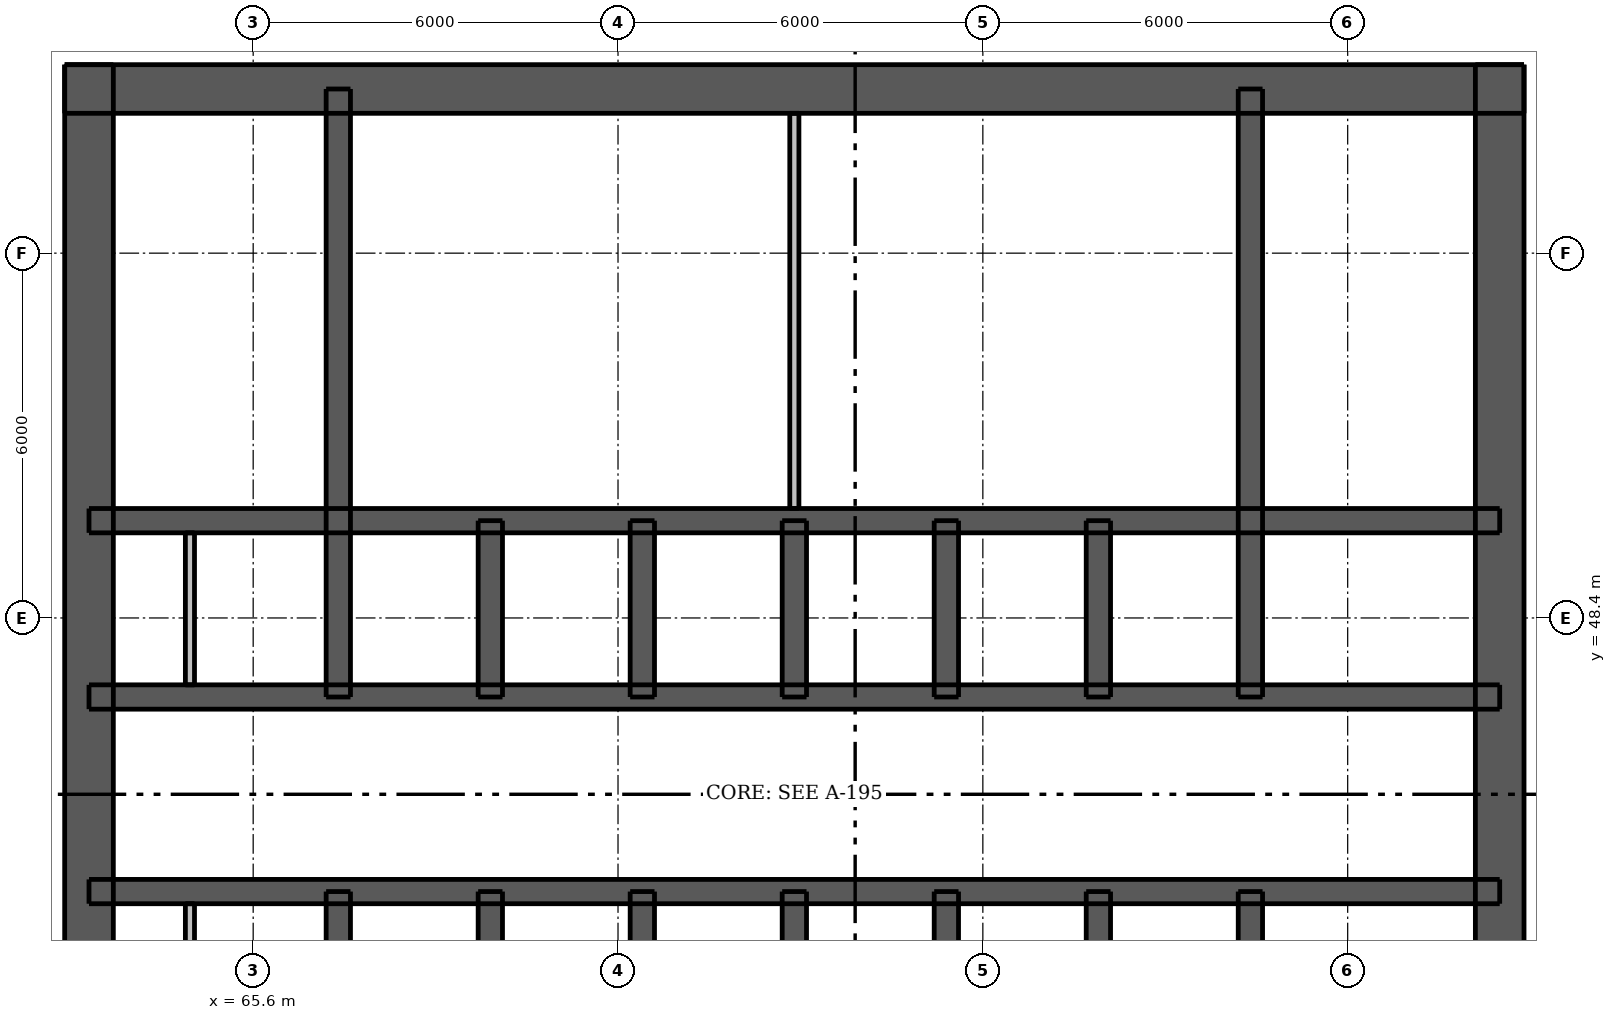
"""IFC4 building model, lengths in metres.
Left out: names, types, materials, properties, quantities, classifications, styles, units other than length and angle.
Written with IfcOpenShell. Run it as: python <this file> out.ifc"""

import sys

from ifc_helpers import new_model, si_unit, direction, frame, frame_2d, origin, place, context, subcontext, project, spatial, rectangle, extrude, element, fill, save


model = new_model("IFC4")
c1 = context("Model", 3, precision=1e-05, world=origin(), true_north=direction((0.0, 1.0)))
c2 = subcontext(c1, "Body", "Model", "MODEL_VIEW")
j1 = project(units=[si_unit("LENGTHUNIT", "METRE"), si_unit("PLANEANGLEUNIT", "RADIAN")], contexts=[c1])
p1 = place(None, origin())
s1 = spatial("IfcSite", under=j1, at=p1, CompositionType="ELEMENT")
p2 = place(p1, origin())
s2 = spatial("IfcBuilding", under=s1, at=p2, CompositionType="ELEMENT")
p3 = place(p2, frame((0.0, 0.0, 108.4)))
s3 = spatial("IfcBuildingStorey", under=s2, at=p3, CompositionType="ELEMENT", Elevation=108.4)
p4 = place(p3, frame((62.5, 57.1, 0.0), z_axis=(0.0, 0.0, 1.0), x_axis=(1.0, 0.0, 0.0)))
e1 = element("IfcWall", 1, at=p4, inside=s3, PredefinedType="SHEAR", context=c2, shape_type="SweptSolid", body=[
    extrude(rectangle(XDim=24.0, YDim=0.8, at=frame_2d((12.0, 0.0))), origin(), (0.0, 0.0, 1.0), 3.05),
])
p5 = place(p4, frame((20.9, 0.0, 0.0)))
e2 = element("IfcOpeningElement", 2, at=p5, cuts=e1, PredefinedType="OPENING", context=c2, shape_type="SweptSolid", body=[
    extrude(rectangle(XDim=1.1, YDim=2.1, at=frame_2d((0.55, 1.05))), frame((0.0, 0.41, 0.0), z_axis=(0.0, -1.0, 0.0), x_axis=(1.0, 0.0, 0.0)), (0.0, 0.0, 1.0), 0.82),
])
p6 = place(p4, frame((2.0, 0.0, 0.0)))
e3 = element("IfcOpeningElement", 3, at=p6, cuts=e1, PredefinedType="OPENING", context=c2, shape_type="SweptSolid", body=[
    extrude(rectangle(XDim=1.1, YDim=2.1, at=frame_2d((0.55, 1.05))), frame((0.0, 0.41, 0.0), z_axis=(0.0, -1.0, 0.0), x_axis=(1.0, 0.0, 0.0)), (0.0, 0.0, 1.0), 0.82),
])
p7 = place(p4, frame((7.9, 0.0, 0.0)))
e4 = element("IfcOpeningElement", 4, at=p7, cuts=e1, PredefinedType="OPENING", context=c2, shape_type="SweptSolid", body=[
    extrude(rectangle(XDim=0.9, YDim=2.1, at=frame_2d((0.45, 1.05))), frame((0.0, 0.41, 0.0), z_axis=(0.0, -1.0, 0.0), x_axis=(1.0, 0.0, 0.0)), (0.0, 0.0, 1.0), 0.82),
])
p8 = place(p4, frame((15.2, 0.0, 0.0)))
e5 = element("IfcOpeningElement", 5, at=p8, cuts=e1, PredefinedType="OPENING", context=c2, shape_type="SweptSolid", body=[
    extrude(rectangle(XDim=0.9, YDim=2.1, at=frame_2d((0.45, 1.05))), frame((0.0, 0.41, 0.0), z_axis=(0.0, -1.0, 0.0), x_axis=(1.0, 0.0, 0.0)), (0.0, 0.0, 1.0), 0.82),
])
p9 = place(p3, frame((62.9, 33.5, 0.0), z_axis=(0.0, 0.0, 1.0), x_axis=(0.0, 1.0, 0.0)))
e6 = element("IfcWall", 6, at=p9, inside=s3, PredefinedType="SHEAR", context=c2, shape_type="SweptSolid", body=[
    extrude(rectangle(XDim=24.0, YDim=0.8, at=frame_2d((12.0, 0.0))), origin(), (0.0, 0.0, 1.0), 3.05),
])
p10 = place(p9, frame((11.2, 0.0, 0.0)))
e7 = element("IfcOpeningElement", 7, at=p10, cuts=e6, PredefinedType="OPENING", context=c2, shape_type="SweptSolid", body=[
    extrude(rectangle(XDim=1.6, YDim=2.1, at=frame_2d((0.8, 1.05))), frame((0.0, 0.41, 0.0), z_axis=(0.0, -1.0, 0.0), x_axis=(1.0, 0.0, 0.0)), (0.0, 0.0, 1.0), 0.82),
])
p11 = place(p3, frame((86.1, 33.5, 0.0), z_axis=(0.0, 0.0, 1.0), x_axis=(0.0, 1.0, 0.0)))
e8 = element("IfcWall", 8, at=p11, inside=s3, PredefinedType="SHEAR", context=c2, shape_type="SweptSolid", body=[
    extrude(rectangle(XDim=24.0, YDim=0.8, at=frame_2d((12.0, 0.0))), origin(), (0.0, 0.0, 1.0), 3.05),
])
p12 = place(p11, frame((11.2, 0.0, 0.0)))
e9 = element("IfcOpeningElement", 9, at=p12, cuts=e8, PredefinedType="OPENING", context=c2, shape_type="SweptSolid", body=[
    extrude(rectangle(XDim=1.6, YDim=2.1, at=frame_2d((0.8, 1.05))), frame((0.0, 0.41, 0.0), z_axis=(0.0, -1.0, 0.0), x_axis=(1.0, 0.0, 0.0)), (0.0, 0.0, 1.0), 0.82),
])
p13 = place(p3, frame((62.9, 43.9, 0.0), z_axis=(0.0, 0.0, 1.0), x_axis=(1.0, 0.0, 0.0)))
e10 = element("IfcWall", 10, at=p13, inside=s3, PredefinedType="SHEAR", context=c2, shape_type="SweptSolid", body=[
    extrude(rectangle(XDim=23.2, YDim=0.4, at=frame_2d((11.6, 0.0))), origin(), (0.0, 0.0, 1.0), 3.05),
])
p14 = place(p13, frame((0.63, 0.0, 0.0)))
e11 = element("IfcOpeningElement", 11, at=p14, cuts=e10, PredefinedType="OPENING", context=c2, shape_type="SweptSolid", body=[
    extrude(rectangle(XDim=0.8, YDim=2.1, at=frame_2d((0.4, 1.05))), frame((0.0, 0.21, 0.0), z_axis=(0.0, -1.0, 0.0), x_axis=(1.0, 0.0, 0.0)), (0.0, 0.0, 1.0), 0.42),
])
p15 = place(p13, frame((2.33, 0.0, 0.0)))
e12 = element("IfcOpeningElement", 12, at=p15, cuts=e10, PredefinedType="OPENING", context=c2, shape_type="SweptSolid", body=[
    extrude(rectangle(XDim=0.9, YDim=2.1, at=frame_2d((0.45, 1.05))), frame((0.0, 0.21, 0.0), z_axis=(0.0, -1.0, 0.0), x_axis=(1.0, 0.0, 0.0)), (0.0, 0.0, 1.0), 0.42),
])
p16 = place(p13, frame((20.6, 0.0, 0.0)))
e13 = element("IfcOpeningElement", 13, at=p16, cuts=e10, PredefinedType="OPENING", context=c2, shape_type="SweptSolid", body=[
    extrude(rectangle(XDim=0.9, YDim=2.1, at=frame_2d((0.45, 1.05))), frame((0.0, 0.21, 0.0), z_axis=(0.0, -1.0, 0.0), x_axis=(1.0, 0.0, 0.0)), (0.0, 0.0, 1.0), 0.42),
])
p17 = place(p13, frame((4.8, 0.0, 0.0)))
e14 = element("IfcOpeningElement", 14, at=p17, cuts=e10, PredefinedType="OPENING", context=c2, shape_type="SweptSolid", body=[
    extrude(rectangle(XDim=1.1, YDim=2.1, at=frame_2d((0.55, 1.05))), frame((0.0, 0.21, 0.0), z_axis=(0.0, -1.0, 0.0), x_axis=(1.0, 0.0, 0.0)), (0.0, 0.0, 1.0), 0.42),
])
p18 = place(p13, frame((7.3, 0.0, 0.0)))
e15 = element("IfcOpeningElement", 15, at=p18, cuts=e10, PredefinedType="OPENING", context=c2, shape_type="SweptSolid", body=[
    extrude(rectangle(XDim=1.1, YDim=2.1, at=frame_2d((0.55, 1.05))), frame((0.0, 0.21, 0.0), z_axis=(0.0, -1.0, 0.0), x_axis=(1.0, 0.0, 0.0)), (0.0, 0.0, 1.0), 0.42),
])
p19 = place(p13, frame((9.8, 0.0, 0.0)))
e16 = element("IfcOpeningElement", 16, at=p19, cuts=e10, PredefinedType="OPENING", context=c2, shape_type="SweptSolid", body=[
    extrude(rectangle(XDim=1.1, YDim=2.1, at=frame_2d((0.55, 1.05))), frame((0.0, 0.21, 0.0), z_axis=(0.0, -1.0, 0.0), x_axis=(1.0, 0.0, 0.0)), (0.0, 0.0, 1.0), 0.42),
])
p20 = place(p13, frame((12.3, 0.0, 0.0)))
e17 = element("IfcOpeningElement", 17, at=p20, cuts=e10, PredefinedType="OPENING", context=c2, shape_type="SweptSolid", body=[
    extrude(rectangle(XDim=1.1, YDim=2.1, at=frame_2d((0.55, 1.05))), frame((0.0, 0.21, 0.0), z_axis=(0.0, -1.0, 0.0), x_axis=(1.0, 0.0, 0.0)), (0.0, 0.0, 1.0), 0.42),
])
p21 = place(p13, frame((14.8, 0.0, 0.0)))
e18 = element("IfcOpeningElement", 18, at=p21, cuts=e10, PredefinedType="OPENING", context=c2, shape_type="SweptSolid", body=[
    extrude(rectangle(XDim=1.1, YDim=2.1, at=frame_2d((0.55, 1.05))), frame((0.0, 0.21, 0.0), z_axis=(0.0, -1.0, 0.0), x_axis=(1.0, 0.0, 0.0)), (0.0, 0.0, 1.0), 0.42),
])
p22 = place(p13, frame((17.3, 0.0, 0.0)))
e19 = element("IfcOpeningElement", 19, at=p22, cuts=e10, PredefinedType="OPENING", context=c2, shape_type="SweptSolid", body=[
    extrude(rectangle(XDim=1.1, YDim=2.1, at=frame_2d((0.55, 1.05))), frame((0.0, 0.21, 0.0), z_axis=(0.0, -1.0, 0.0), x_axis=(1.0, 0.0, 0.0)), (0.0, 0.0, 1.0), 0.42),
])
p23 = place(p3, frame((62.9, 47.1, 0.0), z_axis=(0.0, 0.0, 1.0), x_axis=(1.0, 0.0, 0.0)))
e20 = element("IfcWall", 20, at=p23, inside=s3, PredefinedType="SHEAR", context=c2, shape_type="SweptSolid", body=[
    extrude(rectangle(XDim=23.2, YDim=0.4, at=frame_2d((11.6, 0.0))), origin(), (0.0, 0.0, 1.0), 3.05),
])
p24 = place(p23, frame((0.63, 0.0, 0.0)))
e21 = element("IfcOpeningElement", 21, at=p24, cuts=e20, PredefinedType="OPENING", context=c2, shape_type="SweptSolid", body=[
    extrude(rectangle(XDim=0.8, YDim=2.1, at=frame_2d((0.4, 1.05))), frame((0.0, 0.21, 0.0), z_axis=(0.0, -1.0, 0.0), x_axis=(1.0, 0.0, 0.0)), (0.0, 0.0, 1.0), 0.42),
])
p25 = place(p23, frame((2.33, 0.0, 0.0)))
e22 = element("IfcOpeningElement", 22, at=p25, cuts=e20, PredefinedType="OPENING", context=c2, shape_type="SweptSolid", body=[
    extrude(rectangle(XDim=0.9, YDim=2.1, at=frame_2d((0.45, 1.05))), frame((0.0, 0.21, 0.0), z_axis=(0.0, -1.0, 0.0), x_axis=(1.0, 0.0, 0.0)), (0.0, 0.0, 1.0), 0.42),
])
p26 = place(p23, frame((20.6, 0.0, 0.0)))
e23 = element("IfcOpeningElement", 23, at=p26, cuts=e20, PredefinedType="OPENING", context=c2, shape_type="SweptSolid", body=[
    extrude(rectangle(XDim=0.9, YDim=2.1, at=frame_2d((0.45, 1.05))), frame((0.0, 0.21, 0.0), z_axis=(0.0, -1.0, 0.0), x_axis=(1.0, 0.0, 0.0)), (0.0, 0.0, 1.0), 0.42),
])
p27 = place(p3, frame((62.9, 50.0, 0.0), z_axis=(0.0, 0.0, 1.0), x_axis=(1.0, 0.0, 0.0)))
e24 = element("IfcWall", 24, at=p27, inside=s3, PredefinedType="SHEAR", context=c2, shape_type="SweptSolid", body=[
    extrude(rectangle(XDim=23.2, YDim=0.4, at=frame_2d((11.6, 0.0))), origin(), (0.0, 0.0, 1.0), 3.05),
])
p28 = place(p3, frame((67.0, 33.9, 0.0), z_axis=(0.0, 0.0, 1.0), x_axis=(0.0, 1.0, 0.0)))
e25 = element("IfcWall", 25, at=p28, inside=s3, PredefinedType="SHEAR", context=c2, shape_type="SweptSolid", body=[
    extrude(rectangle(XDim=10.0, YDim=0.4, at=frame_2d((5.0, 0.0))), origin(), (0.0, 0.0, 1.0), 3.05),
])
p29 = place(p28, frame((0.6, 0.0, 0.0)))
e26 = element("IfcOpeningElement", 26, at=p29, cuts=e25, PredefinedType="OPENING", context=c2, shape_type="SweptSolid", body=[
    extrude(rectangle(XDim=1.1, YDim=2.1, at=frame_2d((0.55, 1.05))), frame((0.0, 0.21, 0.0), z_axis=(0.0, -1.0, 0.0), x_axis=(1.0, 0.0, 0.0)), (0.0, 0.0, 1.0), 0.42),
])
for number, where, z_axis, x_axis in (
    (27, (67.0, 47.1, 0.0), (0.0, 0.0, 1.0), (0.0, 1.0, 0.0)),
    (28, (82.0, 33.9, 0.0), (0.0, 0.0, 1.0), (0.0, 1.0, 0.0)),
    (29, (82.0, 47.1, 0.0), (0.0, 0.0, 1.0), (0.0, 1.0, 0.0)),
):
    element("IfcWall", number, at=place(p3, frame(where, z_axis=z_axis, x_axis=x_axis)), inside=s3, PredefinedType="SHEAR", context=c2, shape_type="SweptSolid", body=[
        extrude(rectangle(XDim=10.0, YDim=0.4, at=frame_2d((5.0, 0.0))), origin(), (0.0, 0.0, 1.0), 3.05),
    ])
for number, where, z_axis, x_axis in (
    (30, (69.5, 41.0, 0.0), (0.0, 0.0, 1.0), (0.0, 1.0, 0.0)),
    (31, (69.5, 47.1, 0.0), (0.0, 0.0, 1.0), (0.0, 1.0, 0.0)),
    (32, (72.0, 41.0, 0.0), (0.0, 0.0, 1.0), (0.0, 1.0, 0.0)),
    (33, (72.0, 47.1, 0.0), (0.0, 0.0, 1.0), (0.0, 1.0, 0.0)),
    (34, (74.5, 41.0, 0.0), (0.0, 0.0, 1.0), (0.0, 1.0, 0.0)),
    (35, (74.5, 47.1, 0.0), (0.0, 0.0, 1.0), (0.0, 1.0, 0.0)),
    (36, (77.0, 41.0, 0.0), (0.0, 0.0, 1.0), (0.0, 1.0, 0.0)),
    (37, (77.0, 47.1, 0.0), (0.0, 0.0, 1.0), (0.0, 1.0, 0.0)),
    (38, (79.5, 41.0, 0.0), (0.0, 0.0, 1.0), (0.0, 1.0, 0.0)),
    (39, (79.5, 47.1, 0.0), (0.0, 0.0, 1.0), (0.0, 1.0, 0.0)),
):
    element("IfcWall", number, at=place(p3, frame(where, z_axis=z_axis, x_axis=x_axis)), inside=s3, PredefinedType="SHEAR", context=c2, shape_type="SweptSolid", body=[
        extrude(rectangle(XDim=2.9, YDim=0.4, at=frame_2d((1.45, 0.0))), origin(), (0.0, 0.0, 1.0), 3.05),
    ])
for number, where, z_axis, x_axis in (
    (40, (64.56, 41.2, 0.0), (0.0, 0.0, 1.0), (0.0, 1.0, 0.0)),
    (41, (64.56, 47.3, 0.0), (0.0, 0.0, 1.0), (0.0, 1.0, 0.0)),
):
    element("IfcWall", number, at=place(p3, frame(where, z_axis=z_axis, x_axis=x_axis)), inside=s3, PredefinedType="PLUMBINGWALL", context=c2, shape_type="SweptSolid", body=[
        extrude(rectangle(XDim=2.5, YDim=0.15, at=frame_2d((1.25, 0.0))), origin(), (0.0, 0.0, 1.0), 3.05),
    ])
p30 = place(p3, frame((74.5, 50.2, 0.0), z_axis=(0.0, 0.0, 1.0), x_axis=(0.0, 1.0, 0.0)))
e42 = element("IfcWall", 42, at=p30, inside=s3, PredefinedType="PLUMBINGWALL", context=c2, shape_type="SweptSolid", body=[
    extrude(rectangle(XDim=6.5, YDim=0.15, at=frame_2d((3.25, 0.0))), origin(), (0.0, 0.0, 1.0), 3.05),
])
p31 = place(p5, origin())
e43 = element("IfcDoor", 43, at=p31, inside=s3, OperationType="SINGLE_SWING_RIGHT", PredefinedType="DOOR", context=c2, shape_type="SweptSolid", body=[
    extrude(rectangle(XDim=1.1, YDim=2.1, at=frame_2d((0.55, 1.05))), frame((0.0, -0.337, 0.0), z_axis=(0.0, -1.0, 0.0), x_axis=(1.0, 0.0, 0.0)), (0.0, 0.0, 1.0), 0.05),
])
fill(e2, e43)
p32 = place(p6, origin())
e44 = element("IfcDoor", 44, at=p32, inside=s3, OperationType="SINGLE_SWING_LEFT", PredefinedType="DOOR", context=c2, shape_type="SweptSolid", body=[
    extrude(rectangle(XDim=1.1, YDim=2.1, at=frame_2d((0.55, 1.05))), frame((0.0, -0.337, 0.0), z_axis=(0.0, -1.0, 0.0), x_axis=(1.0, 0.0, 0.0)), (0.0, 0.0, 1.0), 0.05),
])
fill(e3, e44)
p33 = place(p10, origin())
e45 = element("IfcDoor", 45, at=p33, inside=s3, OperationType="DOUBLE_DOOR_SINGLE_SWING", PredefinedType="DOOR", context=c2, shape_type="SweptSolid", body=[
    extrude(rectangle(XDim=1.6, YDim=2.1, at=frame_2d((0.8, 1.05))), frame((0.0, -0.337, 0.0), z_axis=(0.0, -1.0, 0.0), x_axis=(1.0, 0.0, 0.0)), (0.0, 0.0, 1.0), 0.05),
])
fill(e7, e45)
p34 = place(p12, origin())
e46 = element("IfcDoor", 46, at=p34, inside=s3, OperationType="DOUBLE_DOOR_SINGLE_SWING", PredefinedType="DOOR", context=c2, shape_type="SweptSolid", body=[
    extrude(rectangle(XDim=1.6, YDim=2.1, at=frame_2d((0.8, 1.05))), frame((0.0, 0.388, 0.0), z_axis=(0.0, -1.0, 0.0), x_axis=(1.0, 0.0, 0.0)), (0.0, 0.0, 1.0), 0.05),
])
fill(e9, e46)
p35 = place(p14, origin())
e47 = element("IfcDoor", 47, at=p35, inside=s3, OperationType="SINGLE_SWING_LEFT", PredefinedType="DOOR", context=c2, shape_type="SweptSolid", body=[
    extrude(rectangle(XDim=0.8, YDim=2.1, at=frame_2d((0.4, 1.05))), frame((0.0, -0.138, 0.0), z_axis=(0.0, -1.0, 0.0), x_axis=(1.0, 0.0, 0.0)), (0.0, 0.0, 1.0), 0.05),
])
fill(e11, e47)
p36 = place(p15, origin())
e48 = element("IfcDoor", 48, at=p36, inside=s3, OperationType="SINGLE_SWING_RIGHT", PredefinedType="DOOR", context=c2, shape_type="SweptSolid", body=[
    extrude(rectangle(XDim=0.9, YDim=2.1, at=frame_2d((0.45, 1.05))), frame((0.0, -0.138, 0.0), z_axis=(0.0, -1.0, 0.0), x_axis=(1.0, 0.0, 0.0)), (0.0, 0.0, 1.0), 0.05),
])
fill(e12, e48)
p37 = place(p16, origin())
e49 = element("IfcDoor", 49, at=p37, inside=s3, OperationType="SINGLE_SWING_LEFT", PredefinedType="DOOR", context=c2, shape_type="SweptSolid", body=[
    extrude(rectangle(XDim=0.9, YDim=2.1, at=frame_2d((0.45, 1.05))), frame((0.0, -0.138, 0.0), z_axis=(0.0, -1.0, 0.0), x_axis=(1.0, 0.0, 0.0)), (0.0, 0.0, 1.0), 0.05),
])
fill(e13, e49)
p38 = place(p24, origin())
e50 = element("IfcDoor", 50, at=p38, inside=s3, OperationType="SINGLE_SWING_LEFT", PredefinedType="DOOR", context=c2, shape_type="SweptSolid", body=[
    extrude(rectangle(XDim=0.8, YDim=2.1, at=frame_2d((0.4, 1.05))), frame((0.0, 0.188, 0.0), z_axis=(0.0, -1.0, 0.0), x_axis=(1.0, 0.0, 0.0)), (0.0, 0.0, 1.0), 0.05),
])
fill(e21, e50)
p39 = place(p25, origin())
e51 = element("IfcDoor", 51, at=p39, inside=s3, OperationType="SINGLE_SWING_RIGHT", PredefinedType="DOOR", context=c2, shape_type="SweptSolid", body=[
    extrude(rectangle(XDim=0.9, YDim=2.1, at=frame_2d((0.45, 1.05))), frame((0.0, 0.188, 0.0), z_axis=(0.0, -1.0, 0.0), x_axis=(1.0, 0.0, 0.0)), (0.0, 0.0, 1.0), 0.05),
])
fill(e22, e51)
p40 = place(p26, origin())
e52 = element("IfcDoor", 52, at=p40, inside=s3, OperationType="SINGLE_SWING_LEFT", PredefinedType="DOOR", context=c2, shape_type="SweptSolid", body=[
    extrude(rectangle(XDim=0.9, YDim=2.1, at=frame_2d((0.45, 1.05))), frame((0.0, 0.188, 0.0), z_axis=(0.0, -1.0, 0.0), x_axis=(1.0, 0.0, 0.0)), (0.0, 0.0, 1.0), 0.05),
])
fill(e23, e52)
p41 = place(p7, origin())
e53 = element("IfcDoor", 53, at=p41, inside=s3, OperationType="SINGLE_SWING_RIGHT", PredefinedType="DOOR", context=c2, shape_type="SweptSolid", body=[
    extrude(rectangle(XDim=0.9, YDim=2.1, at=frame_2d((0.45, 1.05))), frame((0.0, -0.337, 0.0), z_axis=(0.0, -1.0, 0.0), x_axis=(1.0, 0.0, 0.0)), (0.0, 0.0, 1.0), 0.05),
])
fill(e4, e53)
p42 = place(p8, origin())
e54 = element("IfcDoor", 54, at=p42, inside=s3, OperationType="SINGLE_SWING_RIGHT", PredefinedType="DOOR", context=c2, shape_type="SweptSolid", body=[
    extrude(rectangle(XDim=0.9, YDim=2.1, at=frame_2d((0.45, 1.05))), frame((0.0, -0.337, 0.0), z_axis=(0.0, -1.0, 0.0), x_axis=(1.0, 0.0, 0.0)), (0.0, 0.0, 1.0), 0.05),
])
fill(e5, e54)
p43 = place(p17, origin())
e55 = element("IfcDoor", 55, at=p43, inside=s3, OperationType="DOUBLE_DOOR_SLIDING", PredefinedType="DOOR", context=c2, shape_type="SweptSolid", body=[
    extrude(rectangle(XDim=1.1, YDim=2.1, at=frame_2d((0.55, 1.05))), frame((0.0, 0.025, 0.0), z_axis=(0.0, -1.0, 0.0), x_axis=(1.0, 0.0, 0.0)), (0.0, 0.0, 1.0), 0.05),
])
fill(e14, e55)
p44 = place(p18, origin())
e56 = element("IfcDoor", 56, at=p44, inside=s3, OperationType="DOUBLE_DOOR_SLIDING", PredefinedType="DOOR", context=c2, shape_type="SweptSolid", body=[
    extrude(rectangle(XDim=1.1, YDim=2.1, at=frame_2d((0.55, 1.05))), frame((0.0, 0.025, 0.0), z_axis=(0.0, -1.0, 0.0), x_axis=(1.0, 0.0, 0.0)), (0.0, 0.0, 1.0), 0.05),
])
fill(e15, e56)
p45 = place(p19, origin())
e57 = element("IfcDoor", 57, at=p45, inside=s3, OperationType="DOUBLE_DOOR_SLIDING", PredefinedType="DOOR", context=c2, shape_type="SweptSolid", body=[
    extrude(rectangle(XDim=1.1, YDim=2.1, at=frame_2d((0.55, 1.05))), frame((0.0, 0.025, 0.0), z_axis=(0.0, -1.0, 0.0), x_axis=(1.0, 0.0, 0.0)), (0.0, 0.0, 1.0), 0.05),
])
fill(e16, e57)
p46 = place(p20, origin())
e58 = element("IfcDoor", 58, at=p46, inside=s3, OperationType="DOUBLE_DOOR_SLIDING", PredefinedType="DOOR", context=c2, shape_type="SweptSolid", body=[
    extrude(rectangle(XDim=1.1, YDim=2.1, at=frame_2d((0.55, 1.05))), frame((0.0, 0.025, 0.0), z_axis=(0.0, -1.0, 0.0), x_axis=(1.0, 0.0, 0.0)), (0.0, 0.0, 1.0), 0.05),
])
fill(e17, e58)
p47 = place(p21, origin())
e59 = element("IfcDoor", 59, at=p47, inside=s3, OperationType="DOUBLE_DOOR_SLIDING", PredefinedType="DOOR", context=c2, shape_type="SweptSolid", body=[
    extrude(rectangle(XDim=1.1, YDim=2.1, at=frame_2d((0.55, 1.05))), frame((0.0, 0.025, 0.0), z_axis=(0.0, -1.0, 0.0), x_axis=(1.0, 0.0, 0.0)), (0.0, 0.0, 1.0), 0.05),
])
fill(e18, e59)
p48 = place(p22, origin())
e60 = element("IfcDoor", 60, at=p48, inside=s3, OperationType="DOUBLE_DOOR_SLIDING", PredefinedType="DOOR", context=c2, shape_type="SweptSolid", body=[
    extrude(rectangle(XDim=1.1, YDim=2.1, at=frame_2d((0.55, 1.05))), frame((0.0, 0.025, 0.0), z_axis=(0.0, -1.0, 0.0), x_axis=(1.0, 0.0, 0.0)), (0.0, 0.0, 1.0), 0.05),
])
fill(e19, e60)
save(model, sys.argv[1])
